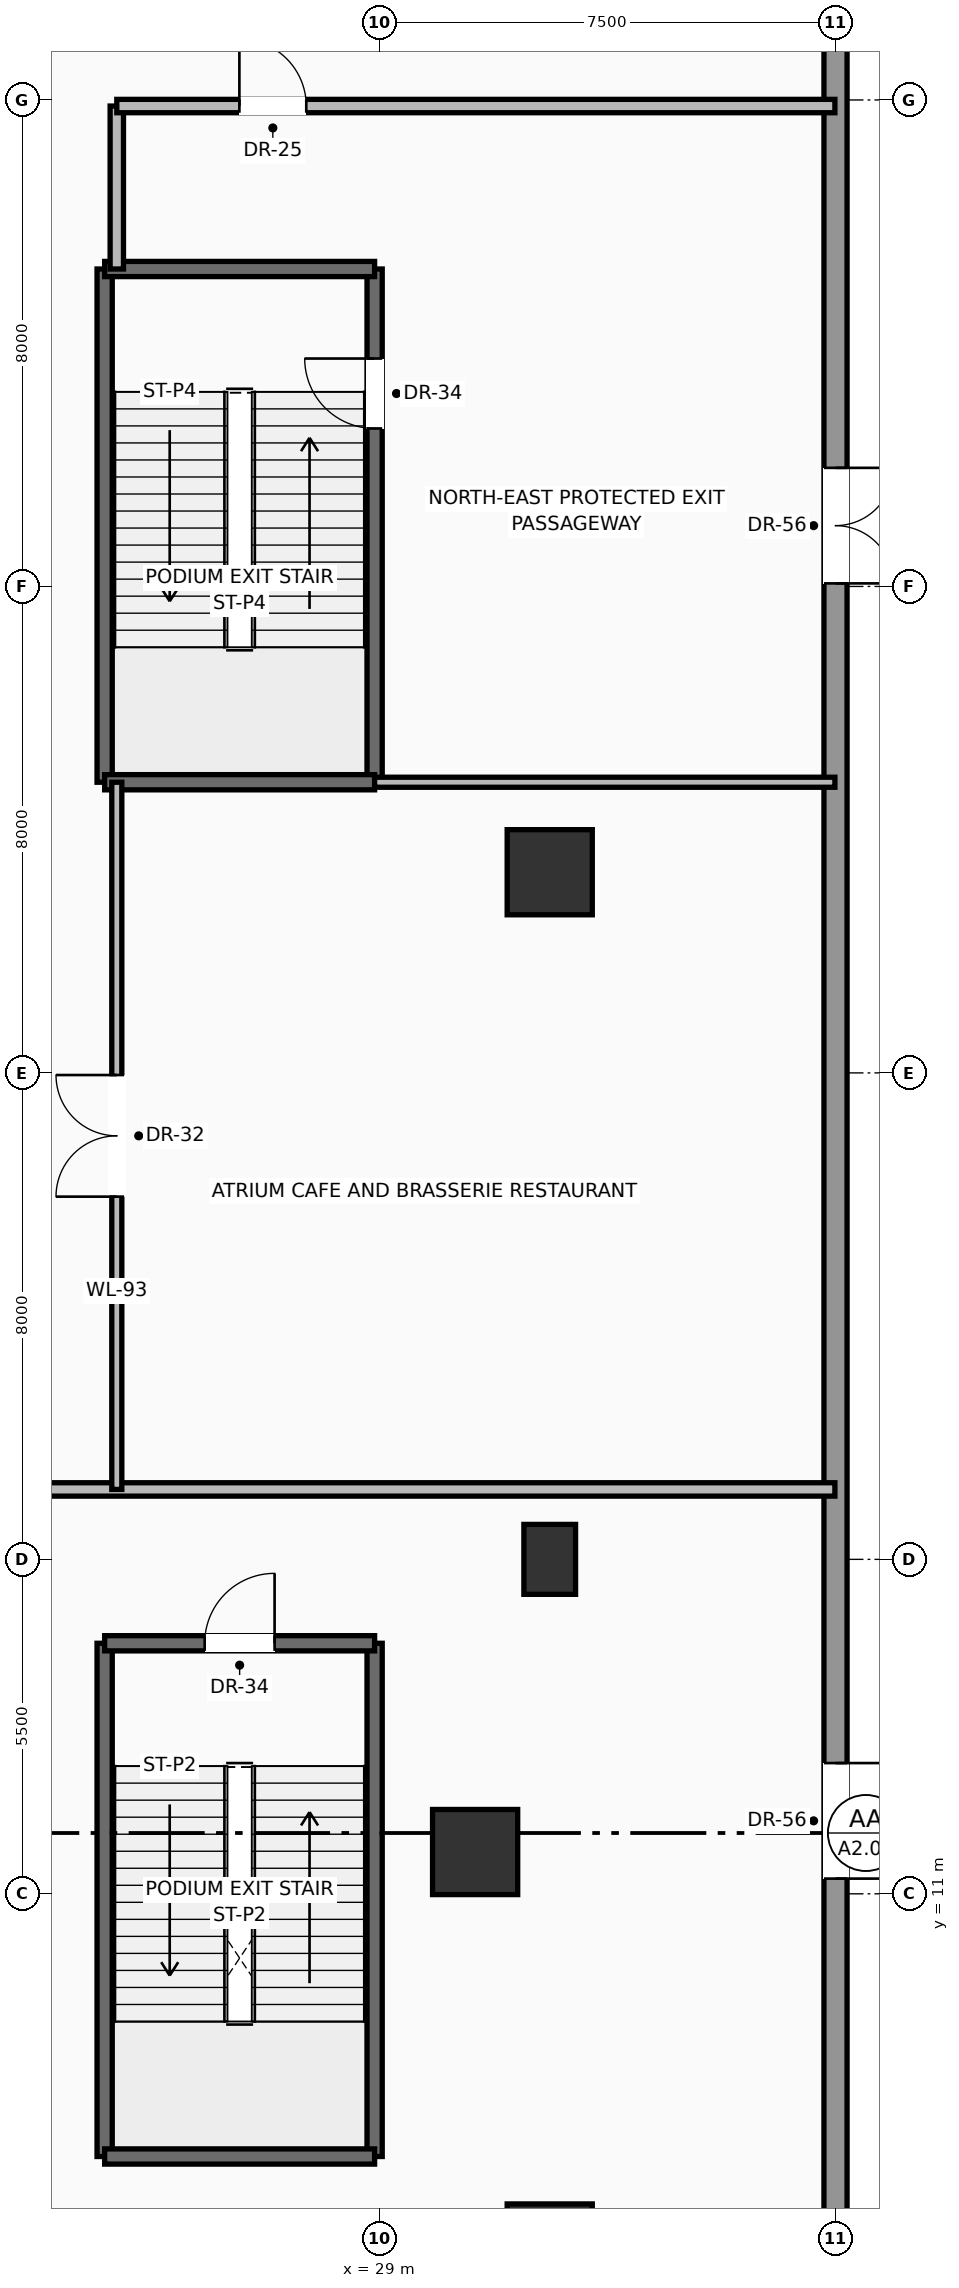
"""IFC4 building model, lengths in metres.
Left out: names, types, materials, properties, quantities, classifications, styles, units other than length and angle.
Written with IfcOpenShell. Run it as: python <this file> out.ifc"""

import sys

from ifc_helpers import new_model, si_unit, direction, frame, frame_2d, origin, origin_2d, place, context, subcontext, project, spatial, rectangle, hollow_rectangle, extrude, source, transform, mapped, element, fill, save


model = new_model("IFC4")
c1 = context("Model", 3, precision=1e-05, world=origin(), true_north=direction((0.0, 1.0)))
c2 = subcontext(c1, "Body", "Model", "MODEL_VIEW")
j1 = project(units=[si_unit("LENGTHUNIT", "METRE"), si_unit("PLANEANGLEUNIT", "RADIAN")], contexts=[c1])
p1 = place(None, origin())
s1 = spatial("IfcSite", under=j1, at=p1, CompositionType="ELEMENT")
p2 = place(p1, origin())
s2 = spatial("IfcBuilding", under=s1, at=p2, CompositionType="ELEMENT")
p3 = place(p2, origin())
s3 = spatial("IfcBuildingStorey", under=s2, at=p3, CompositionType="ELEMENT", Elevation=0.0)
m1 = source(origin(), c2, "Body", "SweptSolid", [
    extrude(rectangle(XDim=0.85, YDim=1.15, at=origin_2d()), origin(), (0.0, 0.0, 1.0), 5.5),
])
p4 = place(p3, frame((31.8, 16.5, 0.0), z_axis=(0.0, 0.0, 1.0), x_axis=(1.0, 0.0, 0.0)))
e1 = element("IfcColumn", 1, at=p4, inside=s3, PredefinedType="COLUMN", context=c2, shape_type="MappedRepresentation", body=[
    mapped(m1, transform((0.0, 0.0, 0.0), scale=1.0)),
])
m2 = source(origin(), c2, "Body", "SweptSolid", [
    extrude(hollow_rectangle(XDim=1.4, YDim=1.4, WallThickness=0.07, at=origin_2d()), origin(), (0.0, 0.0, 1.0), 5.5),
])
for number, where, z_axis, x_axis in (
    (2, (31.8, 5.2, 0.0), (0.0, 0.0, 1.0), (1.0, 0.0, 0.0)),
    (3, (31.8, 27.8, 0.0), (0.0, 0.0, 1.0), (1.0, 0.0, 0.0)),
    (4, (30.573, 11.687, 0.0), (0.0, 0.0, 1.0), (1.0, 0.0, 0.0)),
):
    element("IfcColumn", number, at=place(p3, frame(where, z_axis=z_axis, x_axis=x_axis)), inside=s3, PredefinedType="COLUMN", context=c2, shape_type="MappedRepresentation", body=[
        mapped(m2, transform((0.0, 0.0, 0.0), scale=1.0)),
    ])
p5 = place(p3, frame((36.5, 46.0, 0.0), z_axis=(0.0, 0.0, 1.0), x_axis=(0.0, -1.0, 0.0)))
e5 = element("IfcWall", 5, at=p5, inside=s3, PredefinedType="SOLIDWALL", context=c2, shape_type="SweptSolid", body=[
    extrude(rectangle(XDim=42.0, YDim=0.38, at=frame_2d((21.0, 0.0))), origin(), (0.0, 0.0, 1.0), 4.09),
])
p6 = place(p5, frame((32.85, 0.0, 0.0)))
e6 = element("IfcOpeningElement", 6, at=p6, cuts=e5, PredefinedType="OPENING", context=c2, shape_type="SweptSolid", body=[
    extrude(rectangle(XDim=1.9, YDim=2.3, at=frame_2d((0.95, 1.15))), frame((0.0, 0.2, 0.0), z_axis=(0.0, -1.0, 0.0), x_axis=(1.0, 0.0, 0.0)), (0.0, 0.0, 1.0), 0.4),
])
p7 = place(p5, frame((11.55, 0.0, 0.0)))
e7 = element("IfcOpeningElement", 7, at=p7, cuts=e5, PredefinedType="OPENING", context=c2, shape_type="SweptSolid", body=[
    extrude(rectangle(XDim=1.9, YDim=2.3, at=frame_2d((0.95, 1.15))), frame((0.0, 0.2, 0.0), z_axis=(0.0, -1.0, 0.0), x_axis=(1.0, 0.0, 0.0)), (0.0, 0.0, 1.0), 0.4),
])
for number, where, z_axis, x_axis in (
    (8, (24.48, 6.68, 0.0), (0.0, 0.0, 1.0), (0.0, 1.0, 0.0)),
    (9, (28.92, 6.68, 0.0), (0.0, 0.0, 1.0), (0.0, 1.0, 0.0)),
):
    element("IfcWall", number, at=place(p3, frame(where, z_axis=z_axis, x_axis=x_axis)), inside=s3, PredefinedType="SOLIDWALL", context=c2, shape_type="SweptSolid", body=[
        extrude(rectangle(XDim=8.44, YDim=0.25, at=frame_2d((4.22, 0.0))), origin(), (0.0, 0.0, 1.0), 5.15),
    ])
p8 = place(p3, frame((28.92, 6.68, 0.0), z_axis=(0.0, 0.0, 1.0), x_axis=(-1.0, 0.0, 0.0)))
e10 = element("IfcWall", 10, at=p8, inside=s3, PredefinedType="SOLIDWALL", context=c2, shape_type="SweptSolid", body=[
    extrude(rectangle(XDim=4.44, YDim=0.25, at=frame_2d((2.22, 0.0))), origin(), (0.0, 0.0, 1.0), 5.15),
])
p9 = place(p3, frame((24.48, 15.12, 0.0), z_axis=(0.0, 0.0, 1.0), x_axis=(1.0, 0.0, 0.0)))
e11 = element("IfcWall", 11, at=p9, inside=s3, PredefinedType="SOLIDWALL", context=c2, shape_type="SweptSolid", body=[
    extrude(rectangle(XDim=4.44, YDim=0.25, at=frame_2d((2.22, 0.0))), origin(), (0.0, 0.0, 1.0), 5.15),
])
p10 = place(p9, frame((1.645, 0.0, 0.0)))
e12 = element("IfcOpeningElement", 12, at=p10, cuts=e11, PredefinedType="OPENING", context=c2, shape_type="SweptSolid", body=[
    extrude(rectangle(XDim=1.15, YDim=2.2, at=frame_2d((0.575, 1.1))), frame((0.0, 0.135, 0.0), z_axis=(0.0, -1.0, 0.0), x_axis=(1.0, 0.0, 0.0)), (0.0, 0.0, 1.0), 0.27),
])
p11 = place(p3, frame((24.48, 29.28, 0.0), z_axis=(0.0, 0.0, 1.0), x_axis=(0.0, 1.0, 0.0)))
e13 = element("IfcWall", 13, at=p11, inside=s3, PredefinedType="SOLIDWALL", context=c2, shape_type="SweptSolid", body=[
    extrude(rectangle(XDim=8.44, YDim=0.25, at=frame_2d((4.22, 0.0))), origin(), (0.0, 0.0, 1.0), 5.15),
])
p12 = place(p3, frame((28.92, 29.28, 0.0), z_axis=(0.0, 0.0, 1.0), x_axis=(0.0, 1.0, 0.0)))
e14 = element("IfcWall", 14, at=p12, inside=s3, PredefinedType="SOLIDWALL", context=c2, shape_type="SweptSolid", body=[
    extrude(rectangle(XDim=8.44, YDim=0.25, at=frame_2d((4.22, 0.0))), origin(), (0.0, 0.0, 1.0), 5.15),
])
p13 = place(p12, frame((5.818, 0.0, 0.0)))
e15 = element("IfcOpeningElement", 15, at=p13, cuts=e14, PredefinedType="OPENING", context=c2, shape_type="SweptSolid", body=[
    extrude(rectangle(XDim=1.15, YDim=2.2, at=frame_2d((0.575, 1.1))), frame((0.0, 0.135, 0.0), z_axis=(0.0, -1.0, 0.0), x_axis=(1.0, 0.0, 0.0)), (0.0, 0.0, 1.0), 0.27),
])
for number, where, z_axis, x_axis in (
    (16, (28.92, 29.28, 0.0), (0.0, 0.0, 1.0), (-1.0, 0.0, 0.0)),
    (17, (24.48, 37.72, 0.0), (0.0, 0.0, 1.0), (1.0, 0.0, 0.0)),
):
    element("IfcWall", number, at=place(p3, frame(where, z_axis=z_axis, x_axis=x_axis)), inside=s3, PredefinedType="SOLIDWALL", context=c2, shape_type="SweptSolid", body=[
        extrude(rectangle(XDim=4.44, YDim=0.25, at=frame_2d((2.22, 0.0))), origin(), (0.0, 0.0, 1.0), 5.15),
    ])
p14 = place(p3, frame((10.65, 17.65, 0.0), z_axis=(0.0, 0.0, 1.0), x_axis=(1.0, 0.0, 0.0)))
e18 = element("IfcWall", 18, at=p14, inside=s3, PredefinedType="SOLIDWALL", context=c2, shape_type="SweptSolid", body=[
    extrude(rectangle(XDim=25.84, YDim=0.22, at=frame_2d((12.92, 0.0))), origin(), (0.0, 0.0, 1.0), 4.102),
])
p15 = place(p14, frame((6.835, 0.0, 0.0)))
e19 = element("IfcOpeningElement", 19, at=p15, cuts=e18, PredefinedType="OPENING", context=c2, shape_type="SweptSolid", body=[
    extrude(rectangle(XDim=1.1, YDim=2.2, at=frame_2d((0.55, 1.1))), frame((0.0, 0.12, 0.0), z_axis=(0.0, -1.0, 0.0), x_axis=(1.0, 0.0, 0.0)), (0.0, 0.0, 1.0), 0.24),
])
p16 = place(p3, frame((24.68, 17.65, 0.0), z_axis=(0.0, 0.0, 1.0), x_axis=(0.0, 1.0, 0.0)))
e20 = element("IfcWall", 20, at=p16, inside=s3, PredefinedType="PARTITIONING", context=c2, shape_type="SweptSolid", body=[
    extrude(rectangle(XDim=11.63, YDim=0.165, at=frame_2d((5.815, 0.0))), origin(), (0.0, 0.0, 1.0), 4.215),
])
p17 = place(p16, frame((4.815, 0.0, 0.0)))
e21 = element("IfcOpeningElement", 21, at=p17, cuts=e20, PredefinedType="OPENING", context=c2, shape_type="SweptSolid", body=[
    extrude(rectangle(XDim=2.0, YDim=2.4, at=frame_2d((1.0, 1.2))), frame((0.0, 0.093, 0.0), z_axis=(0.0, -1.0, 0.0), x_axis=(1.0, 0.0, 0.0)), (0.0, 0.0, 1.0), 0.185),
])
p18 = place(p3, frame((28.92, 29.28, 0.0), z_axis=(0.0, 0.0, 1.0), x_axis=(1.0, 0.0, 0.0)))
e22 = element("IfcWall", 22, at=p18, inside=s3, PredefinedType="PARTITIONING", context=c2, shape_type="SweptSolid", body=[
    extrude(rectangle(XDim=7.57, YDim=0.165, at=frame_2d((3.785, 0.0))), origin(), (0.0, 0.0, 1.0), 5.142),
])
p19 = place(p3, frame((24.68, 37.72, 0.0), z_axis=(0.0, 0.0, 1.0), x_axis=(0.0, 1.0, 0.0)))
e23 = element("IfcWall", 23, at=p19, inside=s3, PredefinedType="SOLIDWALL", context=c2, shape_type="SweptSolid", body=[
    extrude(rectangle(XDim=2.68, YDim=0.22, at=frame_2d((1.34, 0.0))), origin(), (0.0, 0.0, 1.0), 5.142),
])
p20 = place(p3, frame((24.68, 40.4, 0.0), z_axis=(0.0, 0.0, 1.0), x_axis=(1.0, 0.0, 0.0)))
e24 = element("IfcWall", 24, at=p20, inside=s3, PredefinedType="SOLIDWALL", context=c2, shape_type="SweptSolid", body=[
    extrude(rectangle(XDim=11.81, YDim=0.22, at=frame_2d((5.905, 0.0))), origin(), (0.0, 0.0, 1.0), 5.142),
])
p21 = place(p20, frame((2.016, 0.0, 0.0)))
e25 = element("IfcOpeningElement", 25, at=p21, cuts=e24, PredefinedType="OPENING", context=c2, shape_type="SweptSolid", body=[
    extrude(rectangle(XDim=1.1, YDim=2.2, at=frame_2d((0.55, 1.1))), frame((0.0, 0.12, 0.0), z_axis=(0.0, -1.0, 0.0), x_axis=(1.0, 0.0, 0.0)), (0.0, 0.0, 1.0), 0.24),
])
m3 = source(origin(), c2, "Body", "SweptSolid", [
    extrude(rectangle(XDim=1.9, YDim=2.3, at=frame_2d((0.95, 1.15))), frame((0.0, 0.025, 0.0), z_axis=(0.0, -1.0, 0.0), x_axis=(1.0, 0.0, 0.0)), (0.0, 0.0, 1.0), 0.05),
])
p22 = place(p6, origin())
e26 = element("IfcDoor", 26, at=p22, inside=s3, OperationType="DOUBLE_DOOR_SINGLE_SWING", PredefinedType="DOOR", context=c2, shape_type="MappedRepresentation", body=[
    mapped(m3, transform((0.0, 0.0, 0.0), scale=1.0)),
])
fill(e6, e26)
p23 = place(p7, origin())
e27 = element("IfcDoor", 27, at=p23, inside=s3, OperationType="DOUBLE_DOOR_SINGLE_SWING", PredefinedType="DOOR", context=c2, shape_type="MappedRepresentation", body=[
    mapped(m3, transform((0.0, 0.0, 0.0), scale=1.0)),
])
fill(e7, e27)
m4 = source(origin(), c2, "Body", "SweptSolid", [
    extrude(rectangle(XDim=1.15, YDim=2.2, at=frame_2d((0.575, 1.1))), frame((0.0, 0.025, 0.0), z_axis=(0.0, -1.0, 0.0), x_axis=(1.0, 0.0, 0.0)), (0.0, 0.0, 1.0), 0.05),
])
p24 = place(p10, origin())
e28 = element("IfcDoor", 28, at=p24, inside=s3, OperationType="SINGLE_SWING_RIGHT", PredefinedType="DOOR", context=c2, shape_type="MappedRepresentation", body=[
    mapped(m4, transform((0.0, 0.0, 0.0), scale=1.0)),
])
fill(e12, e28)
p25 = place(p13, origin())
e29 = element("IfcDoor", 29, at=p25, inside=s3, OperationType="SINGLE_SWING_RIGHT", PredefinedType="DOOR", context=c2, shape_type="MappedRepresentation", body=[
    mapped(m4, transform((0.0, 0.0, 0.0), scale=1.0)),
])
fill(e15, e29)
m5 = source(origin(), c2, "Body", "SweptSolid", [
    extrude(rectangle(XDim=2.0, YDim=2.4, at=frame_2d((1.0, 1.2))), frame((0.0, 0.025, 0.0), z_axis=(0.0, -1.0, 0.0), x_axis=(1.0, 0.0, 0.0)), (0.0, 0.0, 1.0), 0.05),
])
p26 = place(p17, origin())
e30 = element("IfcDoor", 30, at=p26, inside=s3, OperationType="DOUBLE_DOOR_SINGLE_SWING", PredefinedType="DOOR", context=c2, shape_type="MappedRepresentation", body=[
    mapped(m5, transform((0.0, 0.0, 0.0), scale=1.0)),
])
fill(e21, e30)
m6 = source(origin(), c2, "Body", "SweptSolid", [
    extrude(rectangle(XDim=1.1, YDim=2.2, at=frame_2d((0.55, 1.1))), frame((0.0, 0.025, 0.0), z_axis=(0.0, -1.0, 0.0), x_axis=(1.0, 0.0, 0.0)), (0.0, 0.0, 1.0), 0.05),
])
p27 = place(p21, origin())
e31 = element("IfcDoor", 31, at=p27, inside=s3, OperationType="SINGLE_SWING_LEFT", PredefinedType="DOOR", context=c2, shape_type="MappedRepresentation", body=[
    mapped(m6, transform((0.0, 0.0, 0.0), scale=1.0)),
])
fill(e25, e31)
save(model, sys.argv[1])
